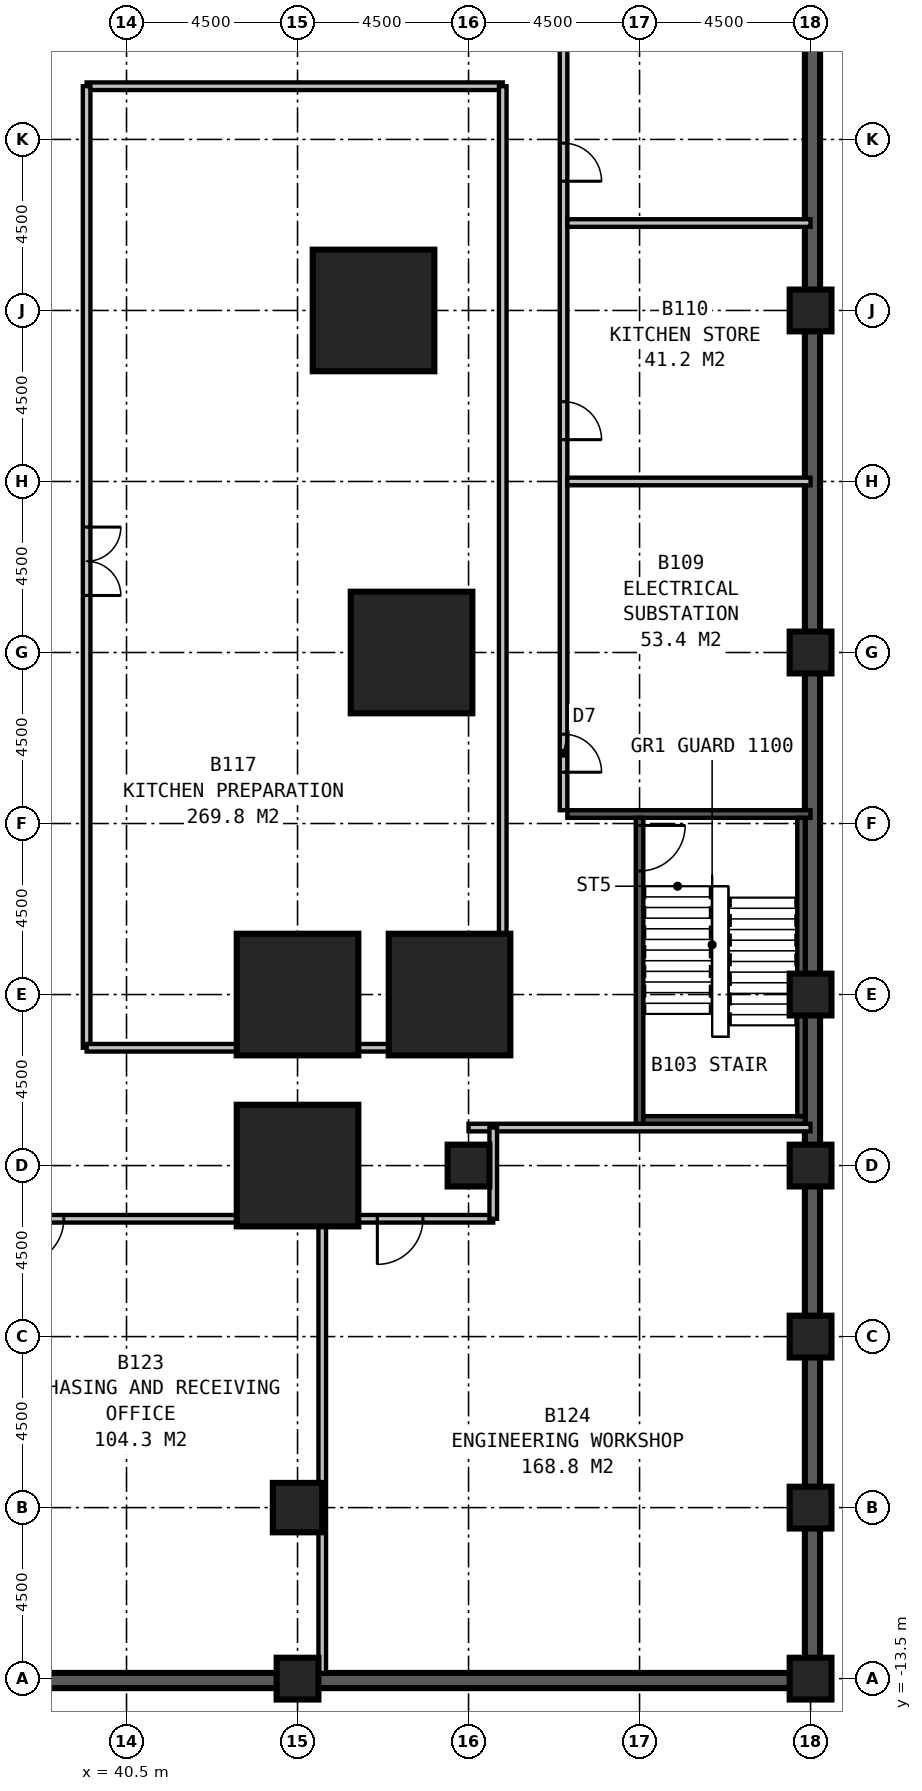
"""IFC4 building model, lengths in metres.
Left out: names, types, materials, properties, quantities, classifications, styles, units other than length and angle.
Written with IfcOpenShell. Run it as: python <this file> out.ifc"""

import sys

from ifc_helpers import new_model, si_unit, direction, frame, frame_2d, origin, origin_2d, place, context, subcontext, project, spatial, rectangle, extrude, element, fill, save


model = new_model("IFC4")
c1 = context("Model", 3, precision=1e-05, world=origin(), true_north=direction((0.0, 1.0)))
c2 = subcontext(c1, "Body", "Model", "MODEL_VIEW")
j1 = project(units=[si_unit("LENGTHUNIT", "METRE"), si_unit("PLANEANGLEUNIT", "RADIAN")], contexts=[c1])
p1 = place(None, origin())
s1 = spatial("IfcSite", under=j1, at=p1, CompositionType="ELEMENT")
p2 = place(p1, origin())
s2 = spatial("IfcBuilding", under=s1, at=p2, CompositionType="ELEMENT")
p3 = place(p2, frame((0.0, 0.0, -4.5)))
s3 = spatial("IfcBuildingStorey", under=s2, at=p3, CompositionType="ELEMENT", Elevation=-4.5)
for number, where, z_axis, x_axis in (
    (1, (45.0, 0.0, 0.0), (0.0, 0.0, 1.0), (1.0, 0.0, 0.0)),
    (2, (45.0, 4.5, 0.0), (0.0, 0.0, 1.0), (1.0, 0.0, 0.0)),
    (3, (49.0, 4.5, 0.0), (0.0, 0.0, 1.0), (1.0, 0.0, 0.0)),
    (4, (48.0, 13.5, 0.0), (0.0, 0.0, 1.0), (1.0, 0.0, 0.0)),
    (5, (47.0, 22.5, 0.0), (0.0, 0.0, 1.0), (1.0, 0.0, 0.0)),
):
    element("IfcColumn", number, at=place(p3, frame(where, z_axis=z_axis, x_axis=x_axis)), inside=s3, PredefinedType="COLUMN", context=c2, shape_type="SweptSolid", body=[
        extrude(rectangle(XDim=3.2, YDim=3.2, at=origin_2d()), origin(), (0.0, 0.0, 1.0), 4.5),
    ])
for number, where, z_axis, x_axis in (
    (6, (58.5, -13.5, 0.0), (0.0, 0.0, 1.0), (1.0, 0.0, 0.0)),
    (7, (58.5, -4.5, 0.0), (0.0, 0.0, 1.0), (1.0, 0.0, 0.0)),
    (8, (58.5, 4.5, 0.0), (0.0, 0.0, 1.0), (1.0, 0.0, 0.0)),
    (9, (58.5, 13.5, 0.0), (0.0, 0.0, 1.0), (1.0, 0.0, 0.0)),
    (10, (58.5, 22.5, 0.0), (0.0, 0.0, 1.0), (1.0, 0.0, 0.0)),
    (11, (58.5, 0.0, 0.0), (0.0, 0.0, 1.0), (1.0, 0.0, 0.0)),
    (12, (45.0, -13.5, 0.0), (0.0, 0.0, 1.0), (1.0, 0.0, 0.0)),
):
    element("IfcColumn", number, at=place(p3, frame(where, z_axis=z_axis, x_axis=x_axis)), inside=s3, PredefinedType="COLUMN", context=c2, shape_type="SweptSolid", body=[
        extrude(rectangle(XDim=1.1, YDim=1.1, at=origin_2d()), origin(), (0.0, 0.0, 1.0), 4.5),
    ])
p4 = place(p3, frame((45.0, -9.0, 0.0), z_axis=(0.0, 0.0, 1.0), x_axis=(1.0, 0.0, 0.0)))
e13 = element("IfcColumn", 13, at=p4, inside=s3, PredefinedType="COLUMN", context=c2, shape_type="SweptSolid", body=[
    extrude(rectangle(XDim=1.3, YDim=1.3, at=origin_2d()), origin(), (0.0, 0.0, 1.0), 4.5),
])
for number, where, z_axis, x_axis in (
    (14, (58.5, -9.0, 0.0), (0.0, 0.0, 1.0), (1.0, 0.0, 0.0)),
    (15, (49.5, 0.0, 0.0), (0.0, 0.0, 1.0), (1.0, 0.0, 0.0)),
):
    element("IfcColumn", number, at=place(p3, frame(where, z_axis=z_axis, x_axis=x_axis)), inside=s3, PredefinedType="COLUMN", context=c2, shape_type="SweptSolid", body=[
        extrude(rectangle(XDim=1.1, YDim=1.1, at=origin_2d()), origin(), (0.0, 0.0, 1.0), 4.5),
    ])
p5 = place(p3, frame((-18.25, -13.55, 0.0), z_axis=(0.0, 0.0, 1.0), x_axis=(1.0, 0.0, 0.0)))
e16 = element("IfcWall", 16, at=p5, inside=s3, PredefinedType="SOLIDWALL", context=c2, shape_type="SweptSolid", body=[
    extrude(rectangle(XDim=77.0, YDim=0.4, at=frame_2d((38.5, 0.0))), origin(), (0.0, 0.0, 1.0), 4.5),
])
p6 = place(p3, frame((58.55, -13.35, 0.0), z_axis=(0.0, 0.0, 1.0), x_axis=(0.0, 1.0, 0.0)))
e17 = element("IfcWall", 17, at=p6, inside=s3, PredefinedType="SOLIDWALL", context=c2, shape_type="SweptSolid", body=[
    extrude(rectangle(XDim=53.7, YDim=0.4, at=frame_2d((26.85, 0.0))), origin(), (0.0, 0.0, 1.0), 4.5),
])
p7 = place(p3, frame((54.0, 1.1, 0.0), z_axis=(0.0, 0.0, 1.0), x_axis=(0.0, 1.0, 0.0)))
e18 = element("IfcWall", 18, at=p7, inside=s3, PredefinedType="SOLIDWALL", context=c2, shape_type="SweptSolid", body=[
    extrude(rectangle(XDim=8.05, YDim=0.2, at=frame_2d((4.025, 0.0))), origin(), (0.0, 0.0, 1.0), 4.2),
])
p8 = place(p7, frame((7.85, 0.0, 0.0), z_axis=(0.0, 0.0, 1.0), x_axis=(-1.0, 0.0, 0.0)))
e19 = element("IfcOpeningElement", 19, at=p8, cuts=e18, PredefinedType="OPENING", context=c2, shape_type="SweptSolid", body=[
    extrude(rectangle(XDim=1.2, YDim=2.1, at=frame_2d((0.6, 1.05))), frame((0.0, 0.11, 0.0), z_axis=(0.0, -1.0, 0.0), x_axis=(1.0, 0.0, 0.0)), (0.0, 0.0, 1.0), 0.22),
])
p9 = place(p3, frame((52.1, 9.25, 0.0), z_axis=(0.0, 0.0, 1.0), x_axis=(1.0, 0.0, 0.0)))
e20 = element("IfcWall", 20, at=p9, inside=s3, PredefinedType="SOLIDWALL", context=c2, shape_type="SweptSolid", body=[
    extrude(rectangle(XDim=6.4, YDim=0.2, at=frame_2d((3.2, 0.0))), origin(), (0.0, 0.0, 1.0), 4.2),
])
p10 = place(p3, frame((54.1, 1.2, 0.0), z_axis=(0.0, 0.0, 1.0), x_axis=(1.0, 0.0, 0.0)))
e21 = element("IfcWall", 21, at=p10, inside=s3, PredefinedType="SOLIDWALL", context=c2, shape_type="SweptSolid", body=[
    extrude(rectangle(XDim=4.25, YDim=0.2, at=frame_2d((2.125, 0.0))), origin(), (0.0, 0.0, 1.0), 4.2),
])
p11 = place(p3, frame((58.25, 1.3, 0.0), z_axis=(0.0, 0.0, 1.0), x_axis=(0.0, 1.0, 0.0)))
e22 = element("IfcWall", 22, at=p11, inside=s3, PredefinedType="SOLIDWALL", context=c2, shape_type="SweptSolid", body=[
    extrude(rectangle(XDim=2.65, YDim=0.2, at=frame_2d((1.325, 0.0))), origin(), (0.0, 0.0, 1.0), 4.2),
])
p12 = place(p3, frame((58.25, 5.05, 0.0), z_axis=(0.0, 0.0, 1.0), x_axis=(0.0, 1.0, 0.0)))
e23 = element("IfcWall", 23, at=p12, inside=s3, PredefinedType="SOLIDWALL", context=c2, shape_type="SweptSolid", body=[
    extrude(rectangle(XDim=4.1, YDim=0.2, at=frame_2d((2.05, 0.0))), origin(), (0.0, 0.0, 1.0), 4.2),
])
p13 = place(p3, frame((52.0, 9.35, 0.0), z_axis=(0.0, 0.0, 1.0), x_axis=(0.0, 1.0, 0.0)))
e24 = element("IfcWall", 24, at=p13, inside=s3, PredefinedType="PARTITIONING", context=c2, shape_type="SweptSolid", body=[
    extrude(rectangle(XDim=31.15, YDim=0.2, at=frame_2d((15.575, 0.0))), origin(), (0.0, 0.0, 1.0), 4.2),
])
p14 = place(p13, frame((2.0, 0.0, 0.0), z_axis=(0.0, 0.0, 1.0), x_axis=(-1.0, 0.0, 0.0)))
e25 = element("IfcOpeningElement", 25, at=p14, cuts=e24, PredefinedType="OPENING", context=c2, shape_type="SweptSolid", body=[
    extrude(rectangle(XDim=1.0, YDim=2.1, at=frame_2d((0.5, 1.05))), frame((0.0, 0.11, 0.0), z_axis=(0.0, -1.0, 0.0), x_axis=(1.0, 0.0, 0.0)), (0.0, 0.0, 1.0), 0.22),
])
p15 = place(p13, frame((10.75, 0.0, 0.0), z_axis=(0.0, 0.0, 1.0), x_axis=(-1.0, 0.0, 0.0)))
e26 = element("IfcOpeningElement", 26, at=p15, cuts=e24, PredefinedType="OPENING", context=c2, shape_type="SweptSolid", body=[
    extrude(rectangle(XDim=1.0, YDim=2.1, at=frame_2d((0.5, 1.05))), frame((0.0, 0.11, 0.0), z_axis=(0.0, -1.0, 0.0), x_axis=(1.0, 0.0, 0.0)), (0.0, 0.0, 1.0), 0.22),
])
p16 = place(p13, frame((17.55, 0.0, 0.0), z_axis=(0.0, 0.0, 1.0), x_axis=(-1.0, 0.0, 0.0)))
e27 = element("IfcOpeningElement", 27, at=p16, cuts=e24, PredefinedType="OPENING", context=c2, shape_type="SweptSolid", body=[
    extrude(rectangle(XDim=1.0, YDim=2.1, at=frame_2d((0.5, 1.05))), frame((0.0, 0.11, 0.0), z_axis=(0.0, -1.0, 0.0), x_axis=(1.0, 0.0, 0.0)), (0.0, 0.0, 1.0), 0.22),
])
p17 = place(p3, frame((49.5, 1.0, 0.0), z_axis=(0.0, 0.0, 1.0), x_axis=(1.0, 0.0, 0.0)))
e28 = element("IfcWall", 28, at=p17, inside=s3, PredefinedType="PARTITIONING", context=c2, shape_type="SweptSolid", body=[
    extrude(rectangle(XDim=9.0, YDim=0.2, at=frame_2d((4.5, 0.0))), origin(), (0.0, 0.0, 1.0), 4.2),
])
for number, where, z_axis, x_axis in (
    (29, (52.1, 18.0, 0.0), (0.0, 0.0, 1.0), (1.0, 0.0, 0.0)),
    (30, (52.1, 24.8, 0.0), (0.0, 0.0, 1.0), (1.0, 0.0, 0.0)),
):
    element("IfcWall", number, at=place(p3, frame(where, z_axis=z_axis, x_axis=x_axis)), inside=s3, PredefinedType="PARTITIONING", context=c2, shape_type="SweptSolid", body=[
        extrude(rectangle(XDim=6.4, YDim=0.2, at=frame_2d((3.2, 0.0))), origin(), (0.0, 0.0, 1.0), 4.2),
    ])
p18 = place(p3, frame((39.45, 3.1, 0.0), z_axis=(0.0, 0.0, 1.0), x_axis=(0.0, 1.0, 0.0)))
e31 = element("IfcWall", 31, at=p18, inside=s3, PredefinedType="PARTITIONING", context=c2, shape_type="SweptSolid", body=[
    extrude(rectangle(XDim=25.3, YDim=0.2, at=frame_2d((12.65, 0.0))), origin(), (0.0, 0.0, 1.0), 4.2),
])
p19 = place(p18, frame((13.7, 0.0, 0.0), z_axis=(0.0, 0.0, 1.0), x_axis=(-1.0, 0.0, 0.0)))
e32 = element("IfcOpeningElement", 32, at=p19, cuts=e31, PredefinedType="OPENING", context=c2, shape_type="SweptSolid", body=[
    extrude(rectangle(XDim=1.8, YDim=2.4, at=frame_2d((0.9, 1.2))), frame((0.0, 0.11, 0.0), z_axis=(0.0, -1.0, 0.0), x_axis=(1.0, 0.0, 0.0)), (0.0, 0.0, 1.0), 0.22),
])
p20 = place(p3, frame((39.45, 3.1, 0.0), z_axis=(0.0, 0.0, 1.0), x_axis=(1.0, 0.0, 0.0)))
e33 = element("IfcWall", 33, at=p20, inside=s3, PredefinedType="PARTITIONING", context=c2, shape_type="SweptSolid", body=[
    extrude(rectangle(XDim=10.95, YDim=0.2, at=frame_2d((5.475, 0.0))), origin(), (0.0, 0.0, 1.0), 4.2),
])
p21 = place(p3, frame((50.4, 3.1, 0.0), z_axis=(0.0, 0.0, 1.0), x_axis=(0.0, 1.0, 0.0)))
e34 = element("IfcWall", 34, at=p21, inside=s3, PredefinedType="PARTITIONING", context=c2, shape_type="SweptSolid", body=[
    extrude(rectangle(XDim=25.3, YDim=0.2, at=frame_2d((12.65, 0.0))), origin(), (0.0, 0.0, 1.0), 4.2),
])
p22 = place(p3, frame((39.45, 28.4, 0.0), z_axis=(0.0, 0.0, 1.0), x_axis=(1.0, 0.0, 0.0)))
e35 = element("IfcWall", 35, at=p22, inside=s3, PredefinedType="PARTITIONING", context=c2, shape_type="SweptSolid", body=[
    extrude(rectangle(XDim=10.95, YDim=0.2, at=frame_2d((5.475, 0.0))), origin(), (0.0, 0.0, 1.0), 4.2),
])
p23 = place(p3, frame((45.65, -13.35, 0.0), z_axis=(0.0, 0.0, 1.0), x_axis=(0.0, 1.0, 0.0)))
e36 = element("IfcWall", 36, at=p23, inside=s3, PredefinedType="PARTITIONING", context=c2, shape_type="SweptSolid", body=[
    extrude(rectangle(XDim=11.85, YDim=0.2, at=frame_2d((5.925, 0.0))), origin(), (0.0, 0.0, 1.0), 3.3),
])
p24 = place(p3, frame((-0.55, -1.4, 0.0), z_axis=(0.0, 0.0, 1.0), x_axis=(1.0, 0.0, 0.0)))
e37 = element("IfcWall", 37, at=p24, inside=s3, PredefinedType="PARTITIONING", context=c2, shape_type="SweptSolid", body=[
    extrude(rectangle(XDim=50.7, YDim=0.2, at=frame_2d((25.35, 0.0))), origin(), (0.0, 0.0, 1.0), 3.3),
])
p25 = place(p24, frame((12.4, 0.0, 0.0), z_axis=(0.0, 0.0, 1.0), x_axis=(-1.0, 0.0, 0.0)))
e38 = element("IfcOpeningElement", 38, at=p25, cuts=e37, PredefinedType="OPENING", context=c2, shape_type="SweptSolid", body=[
    extrude(rectangle(XDim=1.2, YDim=2.1, at=frame_2d((0.6, 1.05))), frame((0.0, 0.11, 0.0), z_axis=(0.0, -1.0, 0.0), x_axis=(1.0, 0.0, 0.0)), (0.0, 0.0, 1.0), 0.22),
])
p26 = place(p24, frame((21.4, 0.0, 0.0), z_axis=(0.0, 0.0, 1.0), x_axis=(-1.0, 0.0, 0.0)))
e39 = element("IfcOpeningElement", 39, at=p26, cuts=e37, PredefinedType="OPENING", context=c2, shape_type="SweptSolid", body=[
    extrude(rectangle(XDim=1.2, YDim=2.1, at=frame_2d((0.6, 1.05))), frame((0.0, 0.11, 0.0), z_axis=(0.0, -1.0, 0.0), x_axis=(1.0, 0.0, 0.0)), (0.0, 0.0, 1.0), 0.22),
])
p27 = place(p24, frame((34.9, 0.0, 0.0), z_axis=(0.0, 0.0, 1.0), x_axis=(-1.0, 0.0, 0.0)))
e40 = element("IfcOpeningElement", 40, at=p27, cuts=e37, PredefinedType="OPENING", context=c2, shape_type="SweptSolid", body=[
    extrude(rectangle(XDim=1.2, YDim=2.1, at=frame_2d((0.6, 1.05))), frame((0.0, 0.11, 0.0), z_axis=(0.0, -1.0, 0.0), x_axis=(1.0, 0.0, 0.0)), (0.0, 0.0, 1.0), 0.22),
])
p28 = place(p24, frame((39.4, 0.0, 0.0), z_axis=(0.0, 0.0, 1.0), x_axis=(-1.0, 0.0, 0.0)))
e41 = element("IfcOpeningElement", 41, at=p28, cuts=e37, PredefinedType="OPENING", context=c2, shape_type="SweptSolid", body=[
    extrude(rectangle(XDim=1.2, YDim=2.1, at=frame_2d((0.6, 1.05))), frame((0.0, 0.11, 0.0), z_axis=(0.0, -1.0, 0.0), x_axis=(1.0, 0.0, 0.0)), (0.0, 0.0, 1.0), 0.22),
])
p29 = place(p24, frame((48.85, 0.0, 0.0), z_axis=(0.0, 0.0, 1.0), x_axis=(-1.0, 0.0, 0.0)))
e42 = element("IfcOpeningElement", 42, at=p29, cuts=e37, PredefinedType="OPENING", context=c2, shape_type="SweptSolid", body=[
    extrude(rectangle(XDim=1.2, YDim=2.1, at=frame_2d((0.6, 1.05))), frame((0.0, 0.11, 0.0), z_axis=(0.0, -1.0, 0.0), x_axis=(1.0, 0.0, 0.0)), (0.0, 0.0, 1.0), 0.22),
])
p30 = place(p3, frame((50.15, -1.4, 0.0), z_axis=(0.0, 0.0, 1.0), x_axis=(0.0, 1.0, 0.0)))
e43 = element("IfcWall", 43, at=p30, inside=s3, PredefinedType="PARTITIONING", context=c2, shape_type="SweptSolid", body=[
    extrude(rectangle(XDim=2.4, YDim=0.2, at=frame_2d((1.2, 0.0))), origin(), (0.0, 0.0, 1.0), 4.2),
])
p31 = place(p8, origin())
e44 = element("IfcDoor", 44, at=p31, inside=s3, OperationType="SINGLE_SWING_LEFT", PredefinedType="DOOR", context=c2, shape_type="SweptSolid", body=[
    extrude(rectangle(XDim=1.2, YDim=2.1, at=frame_2d((0.6, 1.05))), frame((0.0, 0.025, 0.0), z_axis=(0.0, -1.0, 0.0), x_axis=(1.0, 0.0, 0.0)), (0.0, 0.0, 1.0), 0.05),
])
fill(e19, e44)
p32 = place(p14, origin())
e45 = element("IfcDoor", 45, at=p32, inside=s3, OperationType="SINGLE_SWING_RIGHT", PredefinedType="DOOR", context=c2, shape_type="SweptSolid", body=[
    extrude(rectangle(XDim=1.0, YDim=2.1, at=frame_2d((0.5, 1.05))), frame((0.0, 0.025, 0.0), z_axis=(0.0, -1.0, 0.0), x_axis=(1.0, 0.0, 0.0)), (0.0, 0.0, 1.0), 0.05),
])
fill(e25, e45)
p33 = place(p15, origin())
e46 = element("IfcDoor", 46, at=p33, inside=s3, OperationType="SINGLE_SWING_RIGHT", PredefinedType="DOOR", context=c2, shape_type="SweptSolid", body=[
    extrude(rectangle(XDim=1.0, YDim=2.1, at=frame_2d((0.5, 1.05))), frame((0.0, 0.025, 0.0), z_axis=(0.0, -1.0, 0.0), x_axis=(1.0, 0.0, 0.0)), (0.0, 0.0, 1.0), 0.05),
])
fill(e26, e46)
p34 = place(p16, origin())
e47 = element("IfcDoor", 47, at=p34, inside=s3, OperationType="SINGLE_SWING_RIGHT", PredefinedType="DOOR", context=c2, shape_type="SweptSolid", body=[
    extrude(rectangle(XDim=1.0, YDim=2.1, at=frame_2d((0.5, 1.05))), frame((0.0, 0.025, 0.0), z_axis=(0.0, -1.0, 0.0), x_axis=(1.0, 0.0, 0.0)), (0.0, 0.0, 1.0), 0.05),
])
fill(e27, e47)
p35 = place(p19, origin())
e48 = element("IfcDoor", 48, at=p35, inside=s3, OperationType="DOUBLE_DOOR_SINGLE_SWING", PredefinedType="DOOR", context=c2, shape_type="SweptSolid", body=[
    extrude(rectangle(XDim=1.8, YDim=2.4, at=frame_2d((0.9, 1.2))), frame((0.0, 0.025, 0.0), z_axis=(0.0, -1.0, 0.0), x_axis=(1.0, 0.0, 0.0)), (0.0, 0.0, 1.0), 0.05),
])
fill(e32, e48)
p36 = place(p28, origin())
e49 = element("IfcDoor", 49, at=p36, inside=s3, OperationType="SINGLE_SWING_RIGHT", PredefinedType="DOOR", context=c2, shape_type="SweptSolid", body=[
    extrude(rectangle(XDim=1.2, YDim=2.1, at=frame_2d((0.6, 1.05))), frame((0.0, 0.025, 0.0), z_axis=(0.0, -1.0, 0.0), x_axis=(1.0, 0.0, 0.0)), (0.0, 0.0, 1.0), 0.05),
])
fill(e41, e49)
p37 = place(p29, origin())
e50 = element("IfcDoor", 50, at=p37, inside=s3, OperationType="SINGLE_SWING_RIGHT", PredefinedType="DOOR", context=c2, shape_type="SweptSolid", body=[
    extrude(rectangle(XDim=1.2, YDim=2.1, at=frame_2d((0.6, 1.05))), frame((0.0, 0.025, 0.0), z_axis=(0.0, -1.0, 0.0), x_axis=(1.0, 0.0, 0.0)), (0.0, 0.0, 1.0), 0.05),
])
fill(e42, e50)
save(model, sys.argv[1])
